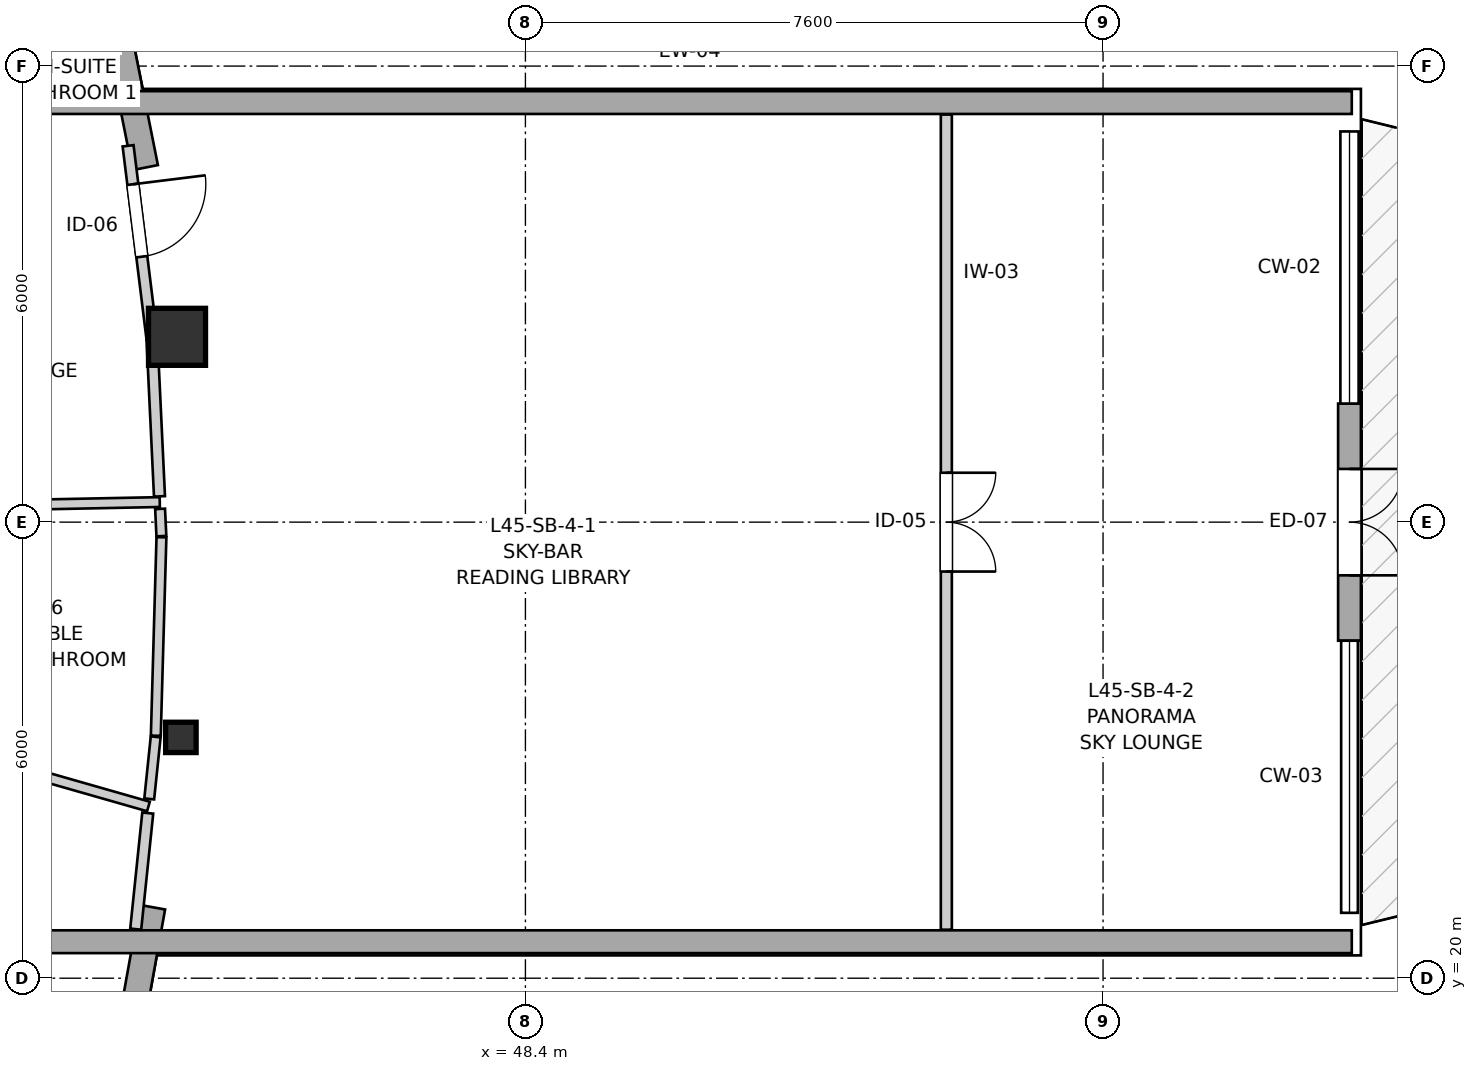
"""IFC4 building model, lengths in metres.
Left out: names, types, materials, properties, quantities, classifications, styles, units other than length and angle.
Written with IfcOpenShell. Run it as: python <this file> out.ifc"""

import sys

from ifc_helpers import new_model, si_unit, direction, frame, frame_2d, origin, origin_2d, place, context, subcontext, project, spatial, rectangle, i_section, extrude, source, transform, mapped, element, fill, save


model = new_model("IFC4")
c1 = context("Model", 3, precision=1e-05, world=origin(), true_north=direction((0.0, 1.0)))
c2 = subcontext(c1, "Body", "Model", "MODEL_VIEW")
j1 = project(units=[si_unit("LENGTHUNIT", "METRE"), si_unit("PLANEANGLEUNIT", "RADIAN")], contexts=[c1])
p1 = place(None, origin())
s1 = spatial("IfcSite", under=j1, at=p1, CompositionType="ELEMENT")
p2 = place(p1, origin())
s2 = spatial("IfcBuilding", under=s1, at=p2, CompositionType="ELEMENT")
p3 = place(p2, frame((0.0, 0.0, 152.2)))
s3 = spatial("IfcBuildingStorey", under=s2, at=p3, CompositionType="ELEMENT", Elevation=152.2)
m1 = source(origin(), c2, "Body", "SweptSolid", [
    extrude(i_section(OverallWidth=0.401, OverallDepth=0.399, WebThickness=0.023, FlangeThickness=0.036, FilletRadius=0.015, at=origin_2d()), origin(), (0.0, 0.0, 1.0), 2.935),
])
p4 = place(p3, frame((43.867, 23.168, 0.0), z_axis=(0.0, 0.0, 1.0), x_axis=(1.0, 0.0, 0.0)))
e1 = element("IfcColumn", 1, at=p4, inside=s3, PredefinedType="PILASTER", context=c2, shape_type="MappedRepresentation", body=[
    mapped(m1, transform((0.0, 0.0, 0.0), x_axis=(1.0, 0.0, 0.0), y_axis=(0.0, 1.0, 0.0), z_axis=(0.0, 0.0, 1.0), scale=1.0)),
])
m2 = source(origin(), c2, "Body", "SweptSolid", [
    extrude(rectangle(XDim=0.75, YDim=0.75, at=origin_2d()), origin(), (0.0, 0.0, 1.0), 2.935),
])
p5 = place(p3, frame((43.816, 28.438, 0.0), z_axis=(0.0, 0.0, 1.0), x_axis=(1.0, 0.0, 0.0)))
e2 = element("IfcColumn", 2, at=p5, inside=s3, PredefinedType="COLUMN", context=c2, shape_type="MappedRepresentation", body=[
    mapped(m2, transform((0.0, 0.0, 0.0), x_axis=(1.0, 0.0, 0.0), y_axis=(0.0, 1.0, 0.0), z_axis=(0.0, 0.0, 1.0), scale=1.0)),
])
p6 = place(p3, frame((42.977, 18.073, 0.0), z_axis=(0.0, 0.0, 1.0), x_axis=(0.177185533742, 0.984177467042, 0.0)))
e3 = element("IfcWall", 3, at=p6, inside=s3, PredefinedType="SOLIDWALL", context=c2, shape_type="SweptSolid", body=[
    extrude(rectangle(XDim=2.907, YDim=0.34, at=frame_2d((1.454, 0.0))), origin(), (0.0, 0.0, 1.0), 2.515),
])
p7 = place(p3, frame((43.398, 30.664, 0.0), z_axis=(0.0, 0.0, 1.0), x_axis=(-0.196147002944, 0.980574501624, 0.0)))
e4 = element("IfcWall", 4, at=p7, inside=s3, PredefinedType="SOLIDWALL", context=c2, shape_type="SweptSolid", body=[
    extrude(rectangle(XDim=3.042, YDim=0.34, at=frame_2d((1.521, 0.0))), origin(), (0.0, 0.0, 1.0), 2.515),
])
p8 = place(p7, frame((2.149, 0.0, 0.82)))
e5 = element("IfcOpeningElement", 5, at=p8, cuts=e4, PredefinedType="OPENING", context=c2, shape_type="SweptSolid", body=[
    extrude(rectangle(XDim=0.58, YDim=1.35, at=frame_2d((0.29, 0.675))), frame((0.0, 0.18, 0.0), z_axis=(0.0, -1.0, 0.0), x_axis=(1.0, 0.0, 0.0)), (0.0, 0.0, 1.0), 0.36),
])
for number, where, z_axis, x_axis in (
    (6, (41.85, 31.52, 0.0), (0.0, 0.0, 1.0), (1.0, 0.0, 0.0)),
    (7, (41.85, 20.48, 0.0), (0.0, 0.0, 1.0), (1.0, 0.0, 0.0)),
):
    element("IfcWall", number, at=place(p3, frame(where, z_axis=z_axis, x_axis=x_axis)), inside=s3, PredefinedType="SOLIDWALL", context=c2, shape_type="SweptSolid", body=[
        extrude(rectangle(XDim=17.423, YDim=0.3, at=frame_2d((8.711, 0.0))), origin(), (0.0, 0.0, 1.0), 2.115),
    ])
p9 = place(p3, frame((59.243, 27.56, 0.0), z_axis=(0.0, 0.0, 1.0), x_axis=(0.0, -1.0, 0.0)))
e8 = element("IfcWall", 8, at=p9, inside=s3, PredefinedType="SOLIDWALL", context=c2, shape_type="SweptSolid", body=[
    extrude(rectangle(XDim=3.12, YDim=0.3, at=frame_2d((1.56, 0.0))), origin(), (0.0, 0.0, 1.0), 2.3),
])
p10 = place(p9, frame((0.86, 0.0, 0.0)))
e9 = element("IfcOpeningElement", 9, at=p10, cuts=e8, PredefinedType="OPENING", context=c2, shape_type="SweptSolid", body=[
    extrude(rectangle(XDim=1.4, YDim=2.15, at=frame_2d((0.7, 1.075))), frame((0.0, 0.16, 0.0), z_axis=(0.0, -1.0, 0.0), x_axis=(1.0, 0.0, 0.0)), (0.0, 0.0, 1.0), 0.32),
])
p11 = place(p3, frame((53.938, 31.362, 0.0), z_axis=(0.0, 0.0, 1.0), x_axis=(0.0, -1.0, 0.0)))
e10 = element("IfcWall", 10, at=p11, inside=s3, PredefinedType="PARTITIONING", context=c2, shape_type="SweptSolid", body=[
    extrude(rectangle(XDim=10.724, YDim=0.145, at=frame_2d((5.362, 0.0))), origin(), (0.0, 0.0, 1.0), 2.935),
])
p12 = place(p11, frame((4.712, 0.0, 0.0)))
e11 = element("IfcOpeningElement", 11, at=p12, cuts=e10, PredefinedType="OPENING", context=c2, shape_type="SweptSolid", body=[
    extrude(rectangle(XDim=1.3, YDim=2.1, at=frame_2d((0.65, 1.05))), frame((0.0, 0.083, 0.0), z_axis=(0.0, -1.0, 0.0), x_axis=(1.0, 0.0, 0.0)), (0.0, 0.0, 1.0), 0.165),
])
p13 = place(p3, frame((43.172, 30.951, 0.0), z_axis=(0.0, 0.0, 1.0), x_axis=(0.122990311665, -0.99240787141, 0.0)))
e12 = element("IfcWall", 12, at=p13, inside=s3, PredefinedType="PARTITIONING", context=c2, shape_type="SweptSolid", body=[
    extrude(rectangle(XDim=2.561, YDim=0.145, at=frame_2d((1.28, 0.0))), origin(), (0.0, 0.0, 1.0), 2.503),
])
p14 = place(p13, frame((0.51, 0.0, 0.0)))
e13 = element("IfcOpeningElement", 13, at=p14, cuts=e12, PredefinedType="OPENING", context=c2, shape_type="SweptSolid", body=[
    extrude(rectangle(XDim=0.96, YDim=2.1, at=frame_2d((0.48, 1.05))), frame((0.0, 0.083, 0.0), z_axis=(0.0, -1.0, 0.0), x_axis=(1.0, 0.0, 0.0)), (0.0, 0.0, 1.0), 0.165),
])
p15 = place(p3, frame((38.436, 23.689, 0.0), z_axis=(0.0, 0.0, 1.0), x_axis=(0.961531027854, -0.274696345942, 0.0)))
e14 = element("IfcWall", 14, at=p15, inside=s3, PredefinedType="PARTITIONING", context=c2, shape_type="SweptSolid", body=[
    extrude(rectangle(XDim=5.205, YDim=0.13, at=frame_2d((2.602, 0.0))), origin(), (0.0, 0.0, 1.0), 2.935),
])
p16 = place(p3, frame((38.419, 26.161, 0.0), z_axis=(0.0, 0.0, 1.0), x_axis=(0.999801492135, 0.019924264719, 0.0)))
e15 = element("IfcWall", 15, at=p16, inside=s3, PredefinedType="PARTITIONING", context=c2, shape_type="SweptSolid", body=[
    extrude(rectangle(XDim=5.171, YDim=0.13, at=frame_2d((2.585, 0.0))), origin(), (0.0, 0.0, 1.0), 2.935),
])
p17 = place(p3, frame((43.537, 23.19, 0.0), z_axis=(0.0, 0.0, 1.0), x_axis=(0.028319632762, 0.999598918767, 0.0)))
e16 = element("IfcWall", 16, at=p17, inside=s3, PredefinedType="PARTITIONING", context=c2, shape_type="SweptSolid", body=[
    extrude(rectangle(XDim=2.612, YDim=0.13, at=frame_2d((1.306, 0.0))), origin(), (0.0, 0.0, 1.0), 2.503),
])
p18 = place(p3, frame((43.488, 28.395, 0.0), z_axis=(0.0, 0.0, 1.0), x_axis=(0.047441179451, -0.998874033346, 0.0)))
e17 = element("IfcWall", 17, at=p18, inside=s3, PredefinedType="PARTITIONING", context=c2, shape_type="SweptSolid", body=[
    extrude(rectangle(XDim=2.058, YDim=0.145, at=frame_2d((1.029, 0.0))), origin(), (0.0, 0.0, 1.0), 2.503),
])
p19 = place(p3, frame((43.273, 20.646, 0.0), z_axis=(0.0, 0.0, 1.0), x_axis=(0.103045636414, 0.99467662927, 0.0)))
e18 = element("IfcWall", 18, at=p19, inside=s3, PredefinedType="PARTITIONING", context=c2, shape_type="SweptSolid", body=[
    extrude(rectangle(XDim=1.535, YDim=0.145, at=frame_2d((0.768, 0.0))), origin(), (0.0, 0.0, 1.0), 2.503),
])
p20 = place(p3, frame((41.778, 31.926, 0.0), z_axis=(0.0, 0.0, 1.0), x_axis=(0.887683122967, 0.460454854681, 0.0)))
e19 = element("IfcWall", 19, at=p20, inside=s3, PredefinedType="PARTITIONING", context=c2, shape_type="SweptSolid", body=[
    extrude(rectangle(XDim=1.19, YDim=0.145, at=frame_2d((0.595, 0.0))), origin(), (0.0, 0.0, 1.0), 2.935),
])
p21 = place(p3, frame((43.45, 22.359, 0.0), z_axis=(0.0, 0.0, 1.0), x_axis=(0.103538633142, 0.994625432737, 0.0)))
e20 = element("IfcWall", 20, at=p21, inside=s3, PredefinedType="PARTITIONING", context=c2, shape_type="SweptSolid", body=[
    extrude(rectangle(XDim=0.821, YDim=0.13, at=frame_2d((0.41, 0.0))), origin(), (0.0, 0.0, 1.0), 2.503),
])
p22 = place(p3, frame((43.593, 26.174, 0.0), z_axis=(0.0, 0.0, 1.0), x_axis=(0.04762980516, -0.998865056782, 0.0)))
e21 = element("IfcWall", 21, at=p22, inside=s3, PredefinedType="PARTITIONING", context=c2, shape_type="SweptSolid", body=[
    extrude(rectangle(XDim=0.359, YDim=0.13, at=frame_2d((0.179, 0.0))), origin(), (0.0, 0.0, 1.0), 2.503),
])
m3 = source(origin(), c2, "Body", "SweptSolid", [
    extrude(rectangle(XDim=1.4, YDim=2.15, at=frame_2d((0.7, 1.075))), frame((0.0, 0.025, 0.0), z_axis=(0.0, -1.0, 0.0), x_axis=(1.0, 0.0, 0.0)), (0.0, 0.0, 1.0), 0.05),
])
p23 = place(p10, origin())
e22 = element("IfcDoor", 22, at=p23, inside=s3, OperationType="DOUBLE_DOOR_SINGLE_SWING", PredefinedType="DOOR", context=c2, shape_type="MappedRepresentation", body=[
    mapped(m3, transform((0.0, 0.0, 0.0), x_axis=(1.0, 0.0, 0.0), y_axis=(0.0, 1.0, 0.0), z_axis=(0.0, 0.0, 1.0), scale=1.0)),
])
fill(e9, e22)
m4 = source(origin(), c2, "Body", "SweptSolid", [
    extrude(rectangle(XDim=1.3, YDim=2.1, at=frame_2d((0.65, 1.05))), frame((0.0, 0.025, 0.0), z_axis=(0.0, -1.0, 0.0), x_axis=(1.0, 0.0, 0.0)), (0.0, 0.0, 1.0), 0.05),
])
p24 = place(p12, origin())
e23 = element("IfcDoor", 23, at=p24, inside=s3, OperationType="DOUBLE_DOOR_SINGLE_SWING", PredefinedType="DOOR", context=c2, shape_type="MappedRepresentation", body=[
    mapped(m4, transform((0.0, 0.0, 0.0), x_axis=(1.0, 0.0, 0.0), y_axis=(0.0, 1.0, 0.0), z_axis=(0.0, 0.0, 1.0), scale=1.0)),
])
fill(e11, e23)
m5 = source(origin(), c2, "Body", "SweptSolid", [
    extrude(rectangle(XDim=0.96, YDim=2.1, at=frame_2d((0.48, 1.05))), frame((0.0, 0.025, 0.0), z_axis=(0.0, -1.0, 0.0), x_axis=(1.0, 0.0, 0.0)), (0.0, 0.0, 1.0), 0.05),
])
p25 = place(p14, origin())
e24 = element("IfcDoor", 24, at=p25, inside=s3, OperationType="SINGLE_SWING_LEFT", PredefinedType="DOOR", context=c2, shape_type="MappedRepresentation", body=[
    mapped(m5, transform((0.0, 0.0, 0.0), x_axis=(1.0, 0.0, 0.0), y_axis=(0.0, 1.0, 0.0), z_axis=(0.0, 0.0, 1.0), scale=1.0)),
])
fill(e13, e24)
save(model, sys.argv[1])
